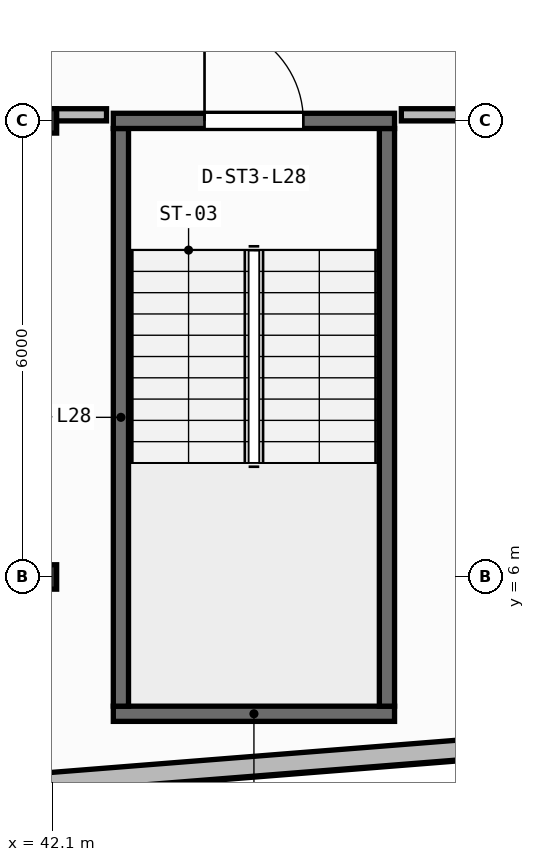
"""IFC4 building model, lengths in metres.
Left out: names, types, materials, properties, quantities, classifications, styles, units other than length and angle.
Written with IfcOpenShell. Run it as: python <this file> out.ifc"""

import sys

from ifc_helpers import new_model, si_unit, direction, frame, frame_2d, origin, origin_2d, place, context, subcontext, project, spatial, rectangle, i_section, extrude, element, fill, save


model = new_model("IFC4")
c1 = context("Model", 3, precision=1e-05, world=origin(), true_north=direction((0.0, 1.0)))
c2 = subcontext(c1, "Body", "Model", "MODEL_VIEW")
j1 = project(units=[si_unit("LENGTHUNIT", "METRE"), si_unit("PLANEANGLEUNIT", "RADIAN")], contexts=[c1])
p1 = place(None, origin())
s1 = spatial("IfcSite", under=j1, at=p1, CompositionType="ELEMENT")
p2 = place(p1, origin())
s2 = spatial("IfcBuilding", under=s1, at=p2, CompositionType="ELEMENT")
p3 = place(p2, frame((0.0, 0.0, 115.2)))
s3 = spatial("IfcBuildingStorey", under=s2, at=p3, CompositionType="ELEMENT", Elevation=115.2)
for number, where, z_axis, x_axis in (
    (1, (42.0, 6.0, 0.0), (0.0, 0.0, 1.0), (1.0, 0.0, 0.0)),
    (2, (42.0, 12.0, 0.0), (0.0, 0.0, 1.0), (1.0, 0.0, 0.0)),
):
    element("IfcColumn", number, at=place(p3, frame(where, z_axis=z_axis, x_axis=x_axis)), inside=s3, PredefinedType="COLUMN", context=c2, shape_type="SweptSolid", body=[
        extrude(i_section(OverallWidth=0.309, OverallDepth=0.321, WebThickness=0.014, FlangeThickness=0.022, FilletRadius=0.017, at=origin_2d()), origin(), (0.0, 0.0, 1.0), 3.95),
    ])
p4 = place(p3, frame((2.76, 0.173, 0.0), z_axis=(0.0, 0.0, 1.0), x_axis=(0.996857931723, 0.079210251617, 0.0)))
e3 = element("IfcWall", 3, at=p4, inside=s3, PredefinedType="STANDARD", context=c2, shape_type="SweptSolid", body=[
    extrude(rectangle(XDim=51.442, YDim=0.26, at=frame_2d((25.721, 0.0))), origin(), (0.0, 0.0, 1.0), 3.71),
])
p5 = place(p4, frame((24.521, 0.0, 0.9)))
e4 = element("IfcOpeningElement", 4, at=p5, cuts=e3, PredefinedType="OPENING", context=c2, shape_type="SweptSolid", body=[
    extrude(rectangle(XDim=2.4, YDim=1.65, at=frame_2d((1.2, 0.825))), frame((0.0, 0.14, 0.0), z_axis=(0.0, -1.0, 0.0), x_axis=(1.0, 0.0, 0.0)), (0.0, 0.0, 1.0), 0.28),
])
p6 = place(p3, frame((42.9, 4.2, 0.0), z_axis=(0.0, 0.0, 1.0), x_axis=(1.0, 0.0, 0.0)))
e5 = element("IfcWall", 5, at=p6, inside=s3, PredefinedType="SHEAR", context=c2, shape_type="SweptSolid", body=[
    extrude(rectangle(XDim=3.7, YDim=0.2, at=frame_2d((1.85, 0.0))), origin(), (0.0, 0.0, 1.0), 3.71),
])
for number, where, z_axis, x_axis in (
    (6, (43.0, 4.3, 0.0), (0.0, 0.0, 1.0), (0.0, 1.0, 0.0)),
    (7, (46.5, 4.3, 0.0), (0.0, 0.0, 1.0), (0.0, 1.0, 0.0)),
):
    element("IfcWall", number, at=place(p3, frame(where, z_axis=z_axis, x_axis=x_axis)), inside=s3, PredefinedType="SHEAR", context=c2, shape_type="SweptSolid", body=[
        extrude(rectangle(XDim=7.6, YDim=0.2, at=frame_2d((3.8, 0.0))), origin(), (0.0, 0.0, 1.0), 3.71),
    ])
p7 = place(p3, frame((42.9, 12.0, 0.0), z_axis=(0.0, 0.0, 1.0), x_axis=(1.0, 0.0, 0.0)))
e8 = element("IfcWall", 8, at=p7, inside=s3, PredefinedType="SHEAR", context=c2, shape_type="SweptSolid", body=[
    extrude(rectangle(XDim=3.7, YDim=0.2, at=frame_2d((1.85, 0.0))), origin(), (0.0, 0.0, 1.0), 3.71),
])
p8 = place(p7, frame((1.2, 0.0, 0.0)))
e9 = element("IfcOpeningElement", 9, at=p8, cuts=e8, PredefinedType="OPENING", context=c2, shape_type="SweptSolid", body=[
    extrude(rectangle(XDim=1.3, YDim=2.15, at=frame_2d((0.65, 1.075))), frame((0.0, 0.11, 0.0), z_axis=(0.0, -1.0, 0.0), x_axis=(1.0, 0.0, 0.0)), (0.0, 0.0, 1.0), 0.22),
])
p9 = place(p3, frame((40.03, 12.08, 0.0), z_axis=(0.0, 0.0, 1.0), x_axis=(1.0, 0.0, 0.0)))
e10 = element("IfcWall", 10, at=p9, inside=s3, PredefinedType="PARTITIONING", context=c2, shape_type="SweptSolid", body=[
    extrude(rectangle(XDim=2.781, YDim=0.16, at=frame_2d((1.39, 0.0))), origin(), (0.0, 0.0, 1.0), 3.083),
])
p10 = place(p3, frame((46.689, 12.08, 0.0), z_axis=(0.0, 0.0, 1.0), x_axis=(1.0, 0.0, 0.0)))
e11 = element("IfcWall", 11, at=p10, inside=s3, PredefinedType="PARTITIONING", context=c2, shape_type="SweptSolid", body=[
    extrude(rectangle(XDim=3.011, YDim=0.16, at=frame_2d((1.505, 0.0))), origin(), (0.0, 0.0, 1.0), 3.083),
])
p11 = place(p8, origin())
e12 = element("IfcDoor", 12, at=p11, inside=s3, OperationType="SINGLE_SWING_LEFT", PredefinedType="DOOR", context=c2, shape_type="SweptSolid", body=[
    extrude(rectangle(XDim=1.3, YDim=2.15, at=frame_2d((0.65, 1.075))), frame((0.0, 0.025, 0.0), z_axis=(0.0, -1.0, 0.0), x_axis=(1.0, 0.0, 0.0)), (0.0, 0.0, 1.0), 0.05),
])
fill(e9, e12)
save(model, sys.argv[1])
